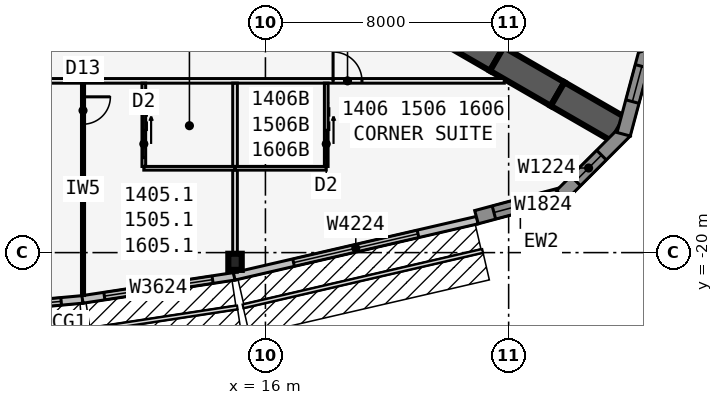
"""IFC4 building model, lengths in metres.
Left out: names, types, materials, properties, quantities, classifications, styles, units other than length and angle.
Written with IfcOpenShell. Run it as: python <this file> out.ifc"""

import sys

from ifc_helpers import new_model, si_unit, direction, frame, frame_2d, origin, origin_2d, place, context, subcontext, project, spatial, polyline, rectangle, i_section, outline, extrude, element, fill, save


model = new_model("IFC4")
c1 = context("Model", 3, precision=1e-05, world=origin(), true_north=direction((0.0, 1.0)))
c2 = subcontext(c1, "Body", "Model", "MODEL_VIEW")
j1 = project(units=[si_unit("LENGTHUNIT", "METRE"), si_unit("PLANEANGLEUNIT", "RADIAN")], contexts=[c1])
p1 = place(None, origin())
s1 = spatial("IfcSite", under=j1, at=p1, CompositionType="ELEMENT")
p2 = place(p1, origin())
s2 = spatial("IfcBuilding", under=s1, at=p2, CompositionType="ELEMENT")
p3 = place(p2, frame((0.0, 0.0, 59.1)))
s3 = spatial("IfcBuildingStorey", under=s2, at=p3, CompositionType="ELEMENT", Elevation=59.1)
for number, where, z_axis, x_axis in (
    (1, (21.61, -12.477, 0.0), (0.0, 0.0, 1.0), (0.866, -0.5, 0.0)),
    (2, (23.61, -13.631, 0.0), (0.0, 0.0, 1.0), (0.866, -0.5, 0.0)),
    (3, (25.61, -14.786, 0.0), (0.0, 0.0, 1.0), (0.866, -0.5, 0.0)),
):
    element("IfcWall", number, at=place(p3, frame(where, z_axis=z_axis, x_axis=x_axis)), inside=s3, PredefinedType="SHEAR", context=c2, shape_type="SweptSolid", body=[
        extrude(rectangle(XDim=2.309, YDim=0.9, at=frame_2d((1.155, 0.0))), origin(), (0.0, 0.0, 1.0), 3.4),
    ])
p4 = place(p3, frame((15.0, -20.303, 0.0), z_axis=(0.0, 0.0, 1.0), x_axis=(1.0, 0.0, 0.0)))
e4 = element("IfcColumn", 4, at=p4, inside=s3, PredefinedType="COLUMN", context=c2, shape_type="SweptSolid", body=[
    extrude(i_section(OverallWidth=0.442, OverallDepth=0.531, WebThickness=0.066, FlangeThickness=0.106, at=origin_2d()), origin(), (0.0, 0.0, 1.0), 3.4),
])
p5 = place(p3, frame((4.989, -21.996, 0.0), z_axis=(0.0, 0.0, 1.0), x_axis=(0.995857256774, 0.090930325692, 0.0)))
e5 = element("IfcWall", 5, at=p5, inside=s3, PredefinedType="STANDARD", context=c2, shape_type="SweptSolid", body=[
    extrude(rectangle(XDim=5.021, YDim=0.25, at=frame_2d((2.51, 0.0))), origin(), (0.0, 0.0, 1.0), 3.235),
])
p6 = place(p5, frame((0.71, 0.0, 0.45)))
e6 = element("IfcOpeningElement", 6, at=p6, cuts=e5, PredefinedType="OPENING", context=c2, shape_type="SweptSolid", body=[
    extrude(rectangle(XDim=3.6, YDim=2.4, at=frame_2d((1.8, 1.2))), frame((0.0, 0.135, 0.0), z_axis=(0.0, -1.0, 0.0), x_axis=(1.0, 0.0, 0.0)), (0.0, 0.0, 1.0), 0.27),
])
p7 = place(p3, frame((9.981, -21.54, 0.0), z_axis=(0.0, 0.0, 1.0), x_axis=(0.988615403399, 0.150464561152, 0.0)))
e7 = element("IfcWall", 7, at=p7, inside=s3, PredefinedType="STANDARD", context=c2, shape_type="SweptSolid", body=[
    extrude(rectangle(XDim=5.058, YDim=0.25, at=frame_2d((2.529, 0.0))), origin(), (0.0, 0.0, 1.0), 3.235),
])
p8 = place(p7, frame((0.729, 0.0, 0.45)))
e8 = element("IfcOpeningElement", 8, at=p8, cuts=e7, PredefinedType="OPENING", context=c2, shape_type="SweptSolid", body=[
    extrude(rectangle(XDim=3.6, YDim=2.4, at=frame_2d((1.8, 1.2))), frame((0.0, 0.135, 0.0), z_axis=(0.0, -1.0, 0.0), x_axis=(1.0, 0.0, 0.0)), (0.0, 0.0, 1.0), 0.27),
])
p9 = place(p3, frame((14.972, -20.781, 0.0), z_axis=(0.0, 0.0, 1.0), x_axis=(0.974279327392, 0.225343720163, 0.0)))
e9 = element("IfcWall", 9, at=p9, inside=s3, PredefinedType="STANDARD", context=c2, shape_type="SweptSolid", body=[
    extrude(rectangle(XDim=8.211, YDim=0.25, at=frame_2d((4.105, 0.0))), origin(), (0.0, 0.0, 1.0), 3.235),
])
p10 = place(p9, frame((2.006, 0.0, 0.45)))
e10 = element("IfcOpeningElement", 10, at=p10, cuts=e9, PredefinedType="OPENING", context=c2, shape_type="SweptSolid", body=[
    extrude(rectangle(XDim=4.2, YDim=2.4, at=frame_2d((2.1, 1.2))), frame((0.0, 0.135, 0.0), z_axis=(0.0, -1.0, 0.0), x_axis=(1.0, 0.0, 0.0)), (0.0, 0.0, 1.0), 0.27),
])
p11 = place(p3, frame((22.942, -18.835, 0.0), z_axis=(0.0, 0.0, 1.0), x_axis=(0.965930548995, 0.258801419081, 0.0)))
e11 = element("IfcWall", 11, at=p11, inside=s3, PredefinedType="SOLIDWALL", context=c2, shape_type="SweptSolid", body=[
    extrude(rectangle(XDim=2.989, YDim=0.45, at=frame_2d((1.494, 0.0))), origin(), (0.0, 0.0, 1.0), 3.235),
])
p12 = place(p11, frame((0.594, 0.0, 0.45)))
e12 = element("IfcOpeningElement", 12, at=p12, cuts=e11, PredefinedType="OPENING", context=c2, shape_type="SweptSolid", body=[
    extrude(rectangle(XDim=1.8, YDim=2.4, at=frame_2d((0.9, 1.2))), frame((0.0, 0.235, 0.0), z_axis=(0.0, -1.0, 0.0), x_axis=(1.0, 0.0, 0.0)), (0.0, 0.0, 1.0), 0.47),
])
p13 = place(p3, frame((25.728, -18.12, 0.0), z_axis=(0.0, 0.0, 1.0), x_axis=(0.707025086683, 0.707188466253, 0.0)))
e13 = element("IfcWall", 13, at=p13, inside=s3, PredefinedType="SOLIDWALL", context=c2, shape_type="SweptSolid", body=[
    extrude(outline(polyline([(2.989, 0.225), (2.93, 0.225), (2.438, 0.093), (2.402, 0.225), (0.0, 0.225), (0.0, -0.225), (2.989, -0.225), (2.989, 0.225)])), origin(), (0.0, 0.0, 1.0), 3.235),
])
p14 = place(p13, frame((0.676, 0.0, 0.45)))
e14 = element("IfcOpeningElement", 14, at=p14, cuts=e13, PredefinedType="OPENING", context=c2, shape_type="SweptSolid", body=[
    extrude(rectangle(XDim=1.2, YDim=2.4, at=frame_2d((0.6, 1.2))), frame((0.0, 0.235, 0.0), z_axis=(0.0, -1.0, 0.0), x_axis=(1.0, 0.0, 0.0)), (0.0, 0.0, 1.0), 0.47),
])
p15 = place(p3, frame((27.783, -16.108, 0.0), z_axis=(0.0, 0.0, 1.0), x_axis=(0.258801419081, 0.965930548995, 0.0)))
e15 = element("IfcWall", 15, at=p15, inside=s3, PredefinedType="SOLIDWALL", context=c2, shape_type="SweptSolid", body=[
    extrude(outline(polyline([(2.989, 0.225), (0.586, 0.225), (0.551, 0.093), (0.06, 0.225), (0.0, 0.225), (0.0, -0.225), (2.989, -0.225), (2.989, 0.225)])), origin(), (0.0, 0.0, 1.0), 3.235),
])
p16 = place(p15, frame((1.113, 0.0, 0.45)))
e16 = element("IfcOpeningElement", 16, at=p16, cuts=e15, PredefinedType="OPENING", context=c2, shape_type="SweptSolid", body=[
    extrude(rectangle(XDim=1.2, YDim=2.4, at=frame_2d((0.6, 1.2))), frame((0.0, 0.235, 0.0), z_axis=(0.0, -1.0, 0.0), x_axis=(1.0, 0.0, 0.0)), (0.0, 0.0, 1.0), 0.47),
])
p17 = place(p3, frame((-23.857, -14.351, 0.0), z_axis=(0.0, 0.0, 1.0), x_axis=(1.0, 0.0, 0.0)))
e17 = element("IfcWall", 17, at=p17, inside=s3, PredefinedType="PARTITIONING", context=c2, shape_type="SweptSolid", body=[
    extrude(rectangle(XDim=47.714, YDim=0.15, at=frame_2d((23.857, 0.0))), origin(), (0.0, 0.0, 1.0), 3.235),
])
p18 = place(p17, frame((4.682, 0.0, 0.0)))
e18 = element("IfcOpeningElement", 18, at=p18, cuts=e17, PredefinedType="OPENING", context=c2, shape_type="SweptSolid", body=[
    extrude(rectangle(XDim=0.95, YDim=2.13, at=frame_2d((0.475, 1.065))), frame((0.0, 0.085, 0.0), z_axis=(0.0, -1.0, 0.0), x_axis=(1.0, 0.0, 0.0)), (0.0, 0.0, 1.0), 0.17),
])
p19 = place(p17, frame((10.282, 0.0, 0.0)))
e19 = element("IfcOpeningElement", 19, at=p19, cuts=e17, PredefinedType="OPENING", context=c2, shape_type="SweptSolid", body=[
    extrude(rectangle(XDim=0.95, YDim=2.13, at=frame_2d((0.475, 1.065))), frame((0.0, 0.085, 0.0), z_axis=(0.0, -1.0, 0.0), x_axis=(1.0, 0.0, 0.0)), (0.0, 0.0, 1.0), 0.17),
])
p20 = place(p17, frame((16.482, 0.0, 0.0)))
e20 = element("IfcOpeningElement", 20, at=p20, cuts=e17, PredefinedType="OPENING", context=c2, shape_type="SweptSolid", body=[
    extrude(rectangle(XDim=0.95, YDim=2.13, at=frame_2d((0.475, 1.065))), frame((0.0, 0.085, 0.0), z_axis=(0.0, -1.0, 0.0), x_axis=(1.0, 0.0, 0.0)), (0.0, 0.0, 1.0), 0.17),
])
p21 = place(p17, frame((21.482, 0.0, 0.0)))
e21 = element("IfcOpeningElement", 21, at=p21, cuts=e17, PredefinedType="OPENING", context=c2, shape_type="SweptSolid", body=[
    extrude(rectangle(XDim=0.95, YDim=2.13, at=frame_2d((0.475, 1.065))), frame((0.0, 0.085, 0.0), z_axis=(0.0, -1.0, 0.0), x_axis=(1.0, 0.0, 0.0)), (0.0, 0.0, 1.0), 0.17),
])
p22 = place(p17, frame((25.857, 0.0, 0.0)))
e22 = element("IfcOpeningElement", 22, at=p22, cuts=e17, PredefinedType="OPENING", context=c2, shape_type="SweptSolid", body=[
    extrude(rectangle(XDim=1.0, YDim=2.13, at=frame_2d((0.5, 1.065))), frame((0.0, 0.085, 0.0), z_axis=(0.0, -1.0, 0.0), x_axis=(1.0, 0.0, 0.0)), (0.0, 0.0, 1.0), 0.17),
])
p23 = place(p17, frame((30.882, 0.0, 0.0)))
e23 = element("IfcOpeningElement", 23, at=p23, cuts=e17, PredefinedType="OPENING", context=c2, shape_type="SweptSolid", body=[
    extrude(rectangle(XDim=0.95, YDim=2.13, at=frame_2d((0.475, 1.065))), frame((0.0, 0.085, 0.0), z_axis=(0.0, -1.0, 0.0), x_axis=(1.0, 0.0, 0.0)), (0.0, 0.0, 1.0), 0.17),
])
p24 = place(p17, frame((42.082, 0.0, 0.0)))
e24 = element("IfcOpeningElement", 24, at=p24, cuts=e17, PredefinedType="OPENING", context=c2, shape_type="SweptSolid", body=[
    extrude(rectangle(XDim=0.95, YDim=2.13, at=frame_2d((0.475, 1.065))), frame((0.0, 0.085, 0.0), z_axis=(0.0, -1.0, 0.0), x_axis=(1.0, 0.0, 0.0)), (0.0, 0.0, 1.0), 0.17),
])
p25 = place(p3, frame((10.0, -14.426, 0.0), z_axis=(0.0, 0.0, 1.0), x_axis=(0.0, -1.0, 0.0)))
e25 = element("IfcWall", 25, at=p25, inside=s3, PredefinedType="PARTITIONING", context=c2, shape_type="SweptSolid", body=[
    extrude(rectangle(XDim=6.985, YDim=0.1, at=frame_2d((3.492, 0.0))), origin(), (0.0, 0.0, 1.0), 2.389),
])
p26 = place(p25, frame((0.45, 0.0, 0.0)))
e26 = element("IfcOpeningElement", 26, at=p26, cuts=e25, PredefinedType="OPENING", context=c2, shape_type="SweptSolid", body=[
    extrude(rectangle(XDim=0.9, YDim=2.13, at=frame_2d((0.45, 1.065))), frame((0.0, 0.06, 0.0), z_axis=(0.0, -1.0, 0.0), x_axis=(1.0, 0.0, 0.0)), (0.0, 0.0, 1.0), 0.12),
])
p27 = place(p3, frame((15.0, -14.426, 0.0), z_axis=(0.0, 0.0, 1.0), x_axis=(0.0, -1.0, 0.0)))
e27 = element("IfcWall", 27, at=p27, inside=s3, PredefinedType="PARTITIONING", context=c2, shape_type="SweptSolid", body=[
    extrude(rectangle(XDim=6.22, YDim=0.15, at=frame_2d((3.11, 0.0))), origin(), (0.0, 0.0, 1.0), 2.389),
])
p28 = place(p3, frame((12.0, -17.226, 0.0), z_axis=(0.0, 0.0, 1.0), x_axis=(1.0, 0.0, 0.0)))
e28 = element("IfcWall", 28, at=p28, inside=s3, PredefinedType="PLUMBINGWALL", context=c2, shape_type="SweptSolid", body=[
    extrude(rectangle(XDim=3.0, YDim=0.12, at=frame_2d((1.5, 0.0))), origin(), (0.0, 0.0, 1.0), 3.235),
])
p29 = place(p3, frame((12.0, -14.426, 0.0), z_axis=(0.0, 0.0, 1.0), x_axis=(0.0, -1.0, 0.0)))
e29 = element("IfcWall", 29, at=p29, inside=s3, PredefinedType="PLUMBINGWALL", context=c2, shape_type="SweptSolid", body=[
    extrude(rectangle(XDim=2.74, YDim=0.12, at=frame_2d((1.37, 0.0))), origin(), (0.0, 0.0, 1.0), 3.235),
])
p30 = place(p29, frame((1.55, 0.0, 0.0)))
e30 = element("IfcOpeningElement", 30, at=p30, cuts=e29, PredefinedType="OPENING", context=c2, shape_type="SweptSolid", body=[
    extrude(rectangle(XDim=0.9, YDim=2.13, at=frame_2d((0.45, 1.065))), frame((0.0, 0.07, 0.0), z_axis=(0.0, -1.0, 0.0), x_axis=(1.0, 0.0, 0.0)), (0.0, 0.0, 1.0), 0.14),
])
p31 = place(p3, frame((15.0, -17.226, 0.0), z_axis=(0.0, 0.0, 1.0), x_axis=(1.0, 0.0, 0.0)))
e31 = element("IfcWall", 31, at=p31, inside=s3, PredefinedType="PLUMBINGWALL", context=c2, shape_type="SweptSolid", body=[
    extrude(rectangle(XDim=3.0, YDim=0.12, at=frame_2d((1.5, 0.0))), origin(), (0.0, 0.0, 1.0), 3.235),
])
p32 = place(p3, frame((18.0, -14.426, 0.0), z_axis=(0.0, 0.0, 1.0), x_axis=(0.0, -1.0, 0.0)))
e32 = element("IfcWall", 32, at=p32, inside=s3, PredefinedType="PLUMBINGWALL", context=c2, shape_type="SweptSolid", body=[
    extrude(rectangle(XDim=2.74, YDim=0.12, at=frame_2d((1.37, 0.0))), origin(), (0.0, 0.0, 1.0), 3.235),
])
p33 = place(p32, frame((1.55, 0.0, 0.0)))
e33 = element("IfcOpeningElement", 33, at=p33, cuts=e32, PredefinedType="OPENING", context=c2, shape_type="SweptSolid", body=[
    extrude(rectangle(XDim=0.9, YDim=2.13, at=frame_2d((0.45, 1.065))), frame((0.0, 0.07, 0.0), z_axis=(0.0, -1.0, 0.0), x_axis=(1.0, 0.0, 0.0)), (0.0, 0.0, 1.0), 0.14),
])
p34 = place(p6, origin())
e34 = element("IfcWindow", 34, at=p34, inside=s3, PartitioningType="SINGLE_PANEL", PredefinedType="WINDOW", context=c2, shape_type="SweptSolid", body=[
    extrude(rectangle(XDim=3.6, YDim=2.4, at=frame_2d((1.8, 1.2))), frame((0.0, 0.03, 0.0), z_axis=(0.0, -1.0, 0.0), x_axis=(1.0, 0.0, 0.0)), (0.0, 0.0, 1.0), 0.06),
])
fill(e6, e34)
p35 = place(p8, origin())
e35 = element("IfcWindow", 35, at=p35, inside=s3, PartitioningType="SINGLE_PANEL", PredefinedType="WINDOW", context=c2, shape_type="SweptSolid", body=[
    extrude(rectangle(XDim=3.6, YDim=2.4, at=frame_2d((1.8, 1.2))), frame((0.0, 0.03, 0.0), z_axis=(0.0, -1.0, 0.0), x_axis=(1.0, 0.0, 0.0)), (0.0, 0.0, 1.0), 0.06),
])
fill(e8, e35)
p36 = place(p10, origin())
e36 = element("IfcWindow", 36, at=p36, inside=s3, PartitioningType="SINGLE_PANEL", PredefinedType="WINDOW", context=c2, shape_type="SweptSolid", body=[
    extrude(rectangle(XDim=4.2, YDim=2.4, at=frame_2d((2.1, 1.2))), frame((0.0, 0.03, 0.0), z_axis=(0.0, -1.0, 0.0), x_axis=(1.0, 0.0, 0.0)), (0.0, 0.0, 1.0), 0.06),
])
fill(e10, e36)
p37 = place(p12, origin())
e37 = element("IfcWindow", 37, at=p37, inside=s3, PartitioningType="SINGLE_PANEL", PredefinedType="WINDOW", context=c2, shape_type="SweptSolid", body=[
    extrude(rectangle(XDim=1.8, YDim=2.4, at=frame_2d((0.9, 1.2))), frame((0.0, 0.03, 0.0), z_axis=(0.0, -1.0, 0.0), x_axis=(1.0, 0.0, 0.0)), (0.0, 0.0, 1.0), 0.06),
])
fill(e12, e37)
p38 = place(p14, origin())
e38 = element("IfcWindow", 38, at=p38, inside=s3, PartitioningType="SINGLE_PANEL", PredefinedType="WINDOW", context=c2, shape_type="SweptSolid", body=[
    extrude(rectangle(XDim=1.2, YDim=2.4, at=frame_2d((0.6, 1.2))), frame((0.0, 0.03, 0.0), z_axis=(0.0, -1.0, 0.0), x_axis=(1.0, 0.0, 0.0)), (0.0, 0.0, 1.0), 0.06),
])
fill(e14, e38)
p39 = place(p16, origin())
e39 = element("IfcWindow", 39, at=p39, inside=s3, PartitioningType="SINGLE_PANEL", PredefinedType="WINDOW", context=c2, shape_type="SweptSolid", body=[
    extrude(rectangle(XDim=1.2, YDim=2.4, at=frame_2d((0.6, 1.2))), frame((0.0, 0.03, 0.0), z_axis=(0.0, -1.0, 0.0), x_axis=(1.0, 0.0, 0.0)), (0.0, 0.0, 1.0), 0.06),
])
fill(e16, e39)
p40 = place(p26, origin())
e40 = element("IfcDoor", 40, at=p40, inside=s3, OperationType="SINGLE_SWING_LEFT", PredefinedType="DOOR", context=c2, shape_type="SweptSolid", body=[
    extrude(rectangle(XDim=0.9, YDim=2.13, at=frame_2d((0.45, 1.065))), frame((0.0, 0.025, 0.0), z_axis=(0.0, -1.0, 0.0), x_axis=(1.0, 0.0, 0.0)), (0.0, 0.0, 1.0), 0.05),
])
fill(e26, e40)
p41 = place(p30, origin())
e41 = element("IfcDoor", 41, at=p41, inside=s3, OperationType="SLIDING_TO_LEFT", PredefinedType="DOOR", context=c2, shape_type="SweptSolid", body=[
    extrude(rectangle(XDim=0.9, YDim=2.13, at=frame_2d((0.45, 1.065))), frame((0.0, 0.025, 0.0), z_axis=(0.0, -1.0, 0.0), x_axis=(1.0, 0.0, 0.0)), (0.0, 0.0, 1.0), 0.05),
])
fill(e30, e41)
p42 = place(p33, origin())
e42 = element("IfcDoor", 42, at=p42, inside=s3, OperationType="SLIDING_TO_LEFT", PredefinedType="DOOR", context=c2, shape_type="SweptSolid", body=[
    extrude(rectangle(XDim=0.9, YDim=2.13, at=frame_2d((0.45, 1.065))), frame((0.0, 0.025, 0.0), z_axis=(0.0, -1.0, 0.0), x_axis=(1.0, 0.0, 0.0)), (0.0, 0.0, 1.0), 0.05),
])
fill(e33, e42)
p43 = place(p24, origin())
e43 = element("IfcDoor", 43, at=p43, inside=s3, OperationType="SINGLE_SWING_LEFT", PredefinedType="DOOR", context=c2, shape_type="SweptSolid", body=[
    extrude(rectangle(XDim=0.95, YDim=2.13, at=frame_2d((0.475, 1.065))), frame((0.0, 0.025, 0.0), z_axis=(0.0, -1.0, 0.0), x_axis=(1.0, 0.0, 0.0)), (0.0, 0.0, 1.0), 0.05),
])
fill(e24, e43)
save(model, sys.argv[1])
